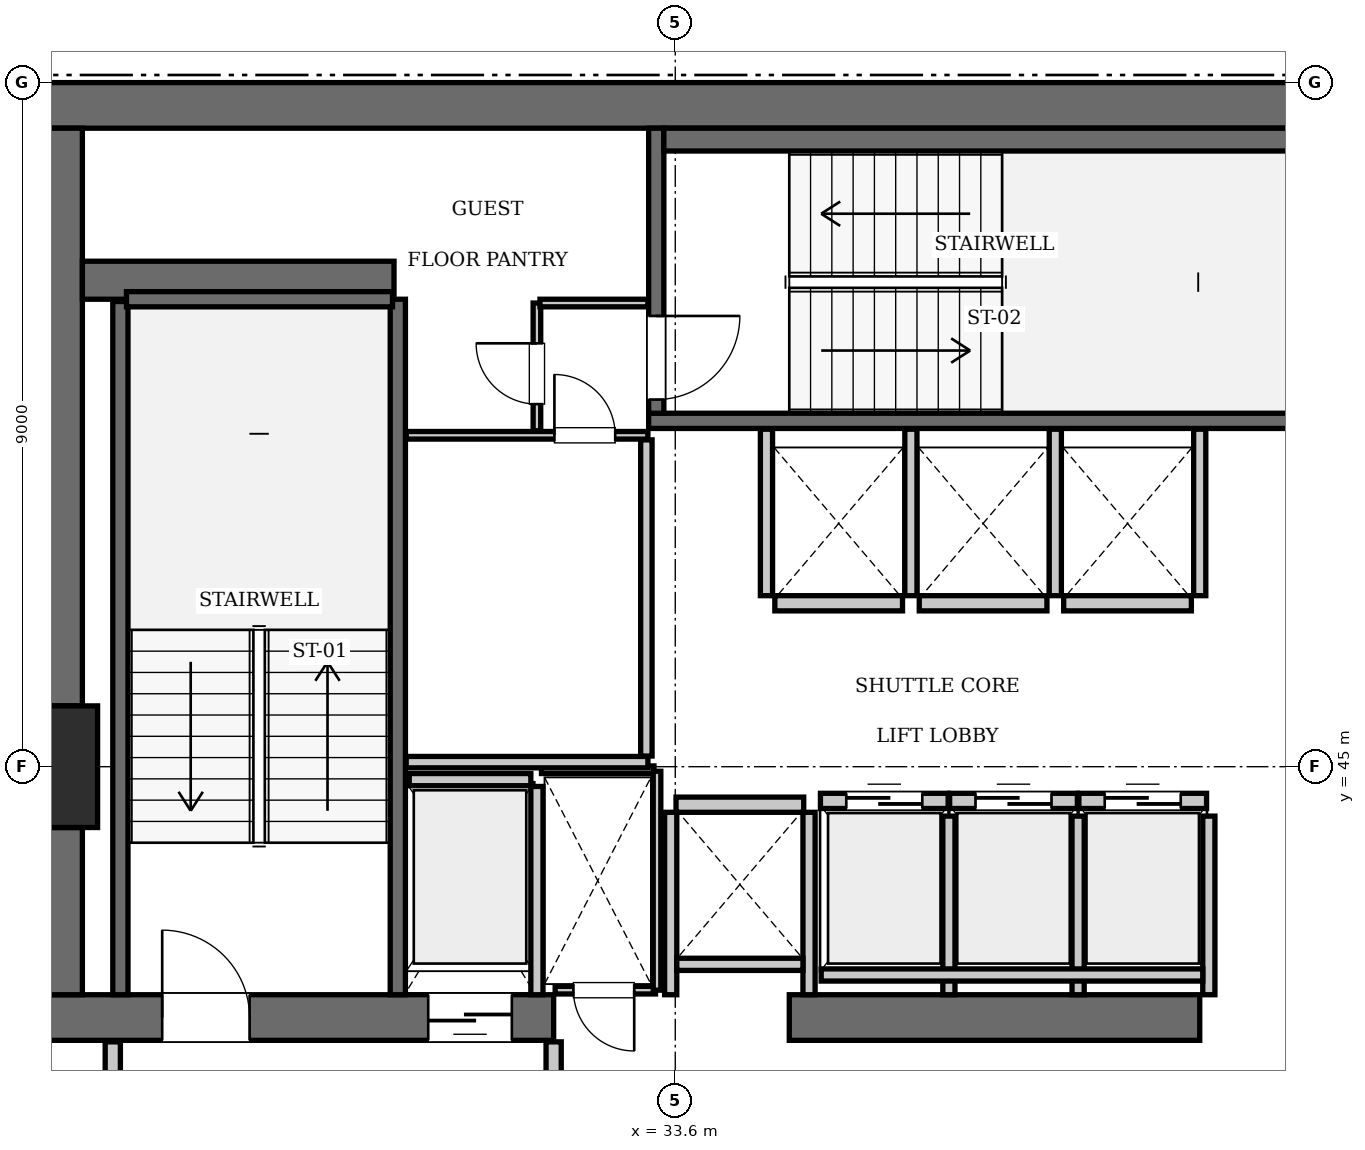
"""IFC4 building model, lengths in metres.
Left out: names, types, materials, properties, quantities, classifications, styles, units other than length and angle.
Written with IfcOpenShell. Run it as: python <this file> out.ifc"""

import sys

from ifc_helpers import new_model, si_unit, direction, frame, frame_2d, origin, origin_2d, place, context, subcontext, project, spatial, rectangle, extrude, element, fill, save


model = new_model("IFC4")
c1 = context("Model", 3, precision=1e-05, world=origin(), true_north=direction((0.0, 1.0)))
c2 = subcontext(c1, "Body", "Model", "MODEL_VIEW")
j1 = project(units=[si_unit("LENGTHUNIT", "METRE"), si_unit("PLANEANGLEUNIT", "RADIAN")], contexts=[c1])
p1 = place(None, origin())
s1 = spatial("IfcSite", under=j1, at=p1, CompositionType="ELEMENT")
p2 = place(p1, origin())
s2 = spatial("IfcBuilding", under=s1, at=p2, CompositionType="ELEMENT")
p3 = place(p2, frame((0.0, 0.0, 262.5)))
s3 = spatial("IfcBuildingStorey", under=s2, at=p3, CompositionType="ELEMENT", Elevation=262.5)
p4 = place(p3, frame((25.2, 45.0, 0.0), z_axis=(0.0, 0.0, 1.0), x_axis=(1.0, 0.0, 0.0)))
e1 = element("IfcColumn", 1, at=p4, inside=s3, PredefinedType="COLUMN", context=c2, shape_type="SweptSolid", body=[
    extrude(rectangle(XDim=1.6, YDim=1.6, at=origin_2d()), origin(), (0.0, 0.0, 1.0), 3.85),
])
p5 = place(p3, frame((25.2, 53.7, 0.0), z_axis=(0.0, 0.0, 1.0), x_axis=(1.0, 0.0, 0.0)))
e2 = element("IfcWall", 2, at=p5, inside=s3, PredefinedType="SHEAR", context=c2, shape_type="SweptSolid", body=[
    extrude(rectangle(XDim=25.2, YDim=0.6, at=frame_2d((12.6, 0.0))), origin(), (0.0, 0.0, 1.0), 3.85),
])
p6 = place(p3, frame((25.2, 41.7, 0.0), z_axis=(0.0, 0.0, 1.0), x_axis=(1.0, 0.0, 0.0)))
e3 = element("IfcWall", 3, at=p6, inside=s3, PredefinedType="SHEAR", context=c2, shape_type="SweptSolid", body=[
    extrude(rectangle(XDim=6.8, YDim=0.6, at=frame_2d((3.4, 0.0))), origin(), (0.0, 0.0, 1.0), 3.85),
])
p7 = place(p6, frame((1.65, 0.0, 0.0)))
e4 = element("IfcOpeningElement", 4, at=p7, cuts=e3, PredefinedType="OPENING", context=c2, shape_type="SweptSolid", body=[
    extrude(rectangle(XDim=1.15, YDim=2.15, at=frame_2d((0.575, 1.075))), frame((0.0, 0.31, 0.0), z_axis=(0.0, -1.0, 0.0), x_axis=(1.0, 0.0, 0.0)), (0.0, 0.0, 1.0), 0.62),
])
p8 = place(p6, frame((5.15, 0.0, 0.0)))
e5 = element("IfcOpeningElement", 5, at=p8, cuts=e3, PredefinedType="OPENING", context=c2, shape_type="SweptSolid", body=[
    extrude(rectangle(XDim=1.1, YDim=2.2, at=frame_2d((0.55, 1.1))), frame((0.0, 0.31, 0.0), z_axis=(0.0, -1.0, 0.0), x_axis=(1.0, 0.0, 0.0)), (0.0, 0.0, 1.0), 0.62),
])
p9 = place(p3, frame((35.1, 41.7, 0.0), z_axis=(0.0, 0.0, 1.0), x_axis=(1.0, 0.0, 0.0)))
e6 = element("IfcWall", 6, at=p9, inside=s3, PredefinedType="SHEAR", context=c2, shape_type="SweptSolid", body=[
    extrude(rectangle(XDim=5.4, YDim=0.6, at=frame_2d((2.7, 0.0))), origin(), (0.0, 0.0, 1.0), 3.85),
])
p10 = place(p3, frame((25.5, 42.0, 0.0), z_axis=(0.0, 0.0, 1.0), x_axis=(0.0, 1.0, 0.0)))
e7 = element("IfcWall", 7, at=p10, inside=s3, PredefinedType="SHEAR", context=c2, shape_type="SweptSolid", body=[
    extrude(rectangle(XDim=2.2, YDim=0.6, at=frame_2d((1.1, 0.0))), origin(), (0.0, 0.0, 1.0), 3.85),
])
p11 = place(p3, frame((25.5, 45.8, 0.0), z_axis=(0.0, 0.0, 1.0), x_axis=(0.0, 1.0, 0.0)))
e8 = element("IfcWall", 8, at=p11, inside=s3, PredefinedType="SHEAR", context=c2, shape_type="SweptSolid", body=[
    extrude(rectangle(XDim=7.6, YDim=0.6, at=frame_2d((3.8, 0.0))), origin(), (0.0, 0.0, 1.0), 3.85),
])
p12 = place(p3, frame((25.8, 51.4, 0.0), z_axis=(0.0, 0.0, 1.0), x_axis=(1.0, 0.0, 0.0)))
e9 = element("IfcWall", 9, at=p12, inside=s3, PredefinedType="SHEAR", context=c2, shape_type="SweptSolid", body=[
    extrude(rectangle(XDim=4.1, YDim=0.5, at=frame_2d((2.05, 0.0))), origin(), (0.0, 0.0, 1.0), 3.85),
])
p13 = place(p3, frame((29.95, 42.0, 0.0), z_axis=(0.0, 0.0, 1.0), x_axis=(0.0, 1.0, 0.0)))
e10 = element("IfcWall", 10, at=p13, inside=s3, PredefinedType="SOLIDWALL", context=c2, shape_type="SweptSolid", body=[
    extrude(rectangle(XDim=9.15, YDim=0.2, at=frame_2d((4.575, 0.0))), origin(), (0.0, 0.0, 1.0), 3.61),
])
p14 = place(p3, frame((26.3, 42.0, 0.0), z_axis=(0.0, 0.0, 1.0), x_axis=(0.0, 1.0, 0.0)))
e11 = element("IfcWall", 11, at=p14, inside=s3, PredefinedType="SOLIDWALL", context=c2, shape_type="SweptSolid", body=[
    extrude(rectangle(XDim=9.12, YDim=0.2, at=frame_2d((4.56, 0.0))), origin(), (0.0, 0.0, 1.0), 3.61),
])
p15 = place(p3, frame((26.38, 51.15, 0.0), z_axis=(0.0, 0.0, 1.0), x_axis=(1.0, 0.0, 0.0)))
e12 = element("IfcWall", 12, at=p15, inside=s3, PredefinedType="SOLIDWALL", context=c2, shape_type="SweptSolid", body=[
    extrude(rectangle(XDim=3.5, YDim=0.2, at=frame_2d((1.75, 0.0))), origin(), (0.0, 0.0, 1.0), 3.61),
])
p16 = place(p3, frame((33.25, 49.55, 0.0), z_axis=(0.0, 0.0, 1.0), x_axis=(1.0, 0.0, 0.0)))
e13 = element("IfcWall", 13, at=p16, inside=s3, PredefinedType="SOLIDWALL", context=c2, shape_type="SweptSolid", body=[
    extrude(rectangle(XDim=9.1, YDim=0.2, at=frame_2d((4.55, 0.0))), origin(), (0.0, 0.0, 1.0), 3.61),
])
p17 = place(p3, frame((33.35, 49.65, 0.0), z_axis=(0.0, 0.0, 1.0), x_axis=(0.0, 1.0, 0.0)))
e14 = element("IfcWall", 14, at=p17, inside=s3, PredefinedType="SOLIDWALL", context=c2, shape_type="SweptSolid", body=[
    extrude(rectangle(XDim=3.75, YDim=0.2, at=frame_2d((1.875, 0.0))), origin(), (0.0, 0.0, 1.0), 3.61),
])
p18 = place(p17, frame((0.18, 0.0, 0.0)))
e15 = element("IfcOpeningElement", 15, at=p18, cuts=e14, PredefinedType="OPENING", context=c2, shape_type="SweptSolid", body=[
    extrude(rectangle(XDim=1.1, YDim=2.15, at=frame_2d((0.55, 1.075))), frame((0.0, 0.11, 0.0), z_axis=(0.0, -1.0, 0.0), x_axis=(1.0, 0.0, 0.0)), (0.0, 0.0, 1.0), 0.22),
])
p19 = place(p3, frame((33.45, 53.25, 0.0), z_axis=(0.0, 0.0, 1.0), x_axis=(1.0, 0.0, 0.0)))
e16 = element("IfcWall", 16, at=p19, inside=s3, PredefinedType="SOLIDWALL", context=c2, shape_type="SweptSolid", body=[
    extrude(rectangle(XDim=8.7, YDim=0.3, at=frame_2d((4.35, 0.0))), origin(), (0.0, 0.0, 1.0), 3.61),
])
p20 = place(p3, frame((35.51, 44.55, 0.0), z_axis=(0.0, 0.0, 1.0), x_axis=(1.0, 0.0, 0.0)))
e17 = element("IfcWall", 17, at=p20, inside=s3, PredefinedType="SOLIDWALL", context=c2, shape_type="SweptSolid", body=[
    extrude(rectangle(XDim=1.68, YDim=0.2, at=frame_2d((0.84, 0.0))), origin(), (0.0, 0.0, 1.0), 3.61),
])
p21 = place(p20, frame((0.34, 0.0, 0.0)))
e18 = element("IfcOpeningElement", 18, at=p21, cuts=e17, PredefinedType="OPENING", context=c2, shape_type="SweptSolid", body=[
    extrude(rectangle(XDim=1.0, YDim=2.15, at=frame_2d((0.5, 1.075))), frame((0.0, 0.11, 0.0), z_axis=(0.0, -1.0, 0.0), x_axis=(1.0, 0.0, 0.0)), (0.0, 0.0, 1.0), 0.22),
])
p22 = place(p3, frame((37.21, 44.55, 0.0), z_axis=(0.0, 0.0, 1.0), x_axis=(1.0, 0.0, 0.0)))
e19 = element("IfcWall", 19, at=p22, inside=s3, PredefinedType="SOLIDWALL", context=c2, shape_type="SweptSolid", body=[
    extrude(rectangle(XDim=1.68, YDim=0.2, at=frame_2d((0.84, 0.0))), origin(), (0.0, 0.0, 1.0), 3.61),
])
p23 = place(p22, frame((0.34, 0.0, 0.0)))
e20 = element("IfcOpeningElement", 20, at=p23, cuts=e19, PredefinedType="OPENING", context=c2, shape_type="SweptSolid", body=[
    extrude(rectangle(XDim=1.0, YDim=2.15, at=frame_2d((0.5, 1.075))), frame((0.0, 0.11, 0.0), z_axis=(0.0, -1.0, 0.0), x_axis=(1.0, 0.0, 0.0)), (0.0, 0.0, 1.0), 0.22),
])
p24 = place(p3, frame((38.91, 44.55, 0.0), z_axis=(0.0, 0.0, 1.0), x_axis=(1.0, 0.0, 0.0)))
e21 = element("IfcWall", 21, at=p24, inside=s3, PredefinedType="SOLIDWALL", context=c2, shape_type="SweptSolid", body=[
    extrude(rectangle(XDim=1.68, YDim=0.2, at=frame_2d((0.84, 0.0))), origin(), (0.0, 0.0, 1.0), 3.61),
])
p25 = place(p24, frame((0.34, 0.0, 0.0)))
e22 = element("IfcOpeningElement", 22, at=p25, cuts=e21, PredefinedType="OPENING", context=c2, shape_type="SweptSolid", body=[
    extrude(rectangle(XDim=1.0, YDim=2.15, at=frame_2d((0.5, 1.075))), frame((0.0, 0.11, 0.0), z_axis=(0.0, -1.0, 0.0), x_axis=(1.0, 0.0, 0.0)), (0.0, 0.0, 1.0), 0.22),
])
p26 = place(p3, frame((34.91, 47.15, 0.0), z_axis=(0.0, 0.0, 1.0), x_axis=(1.0, 0.0, 0.0)))
e23 = element("IfcWall", 23, at=p26, inside=s3, PredefinedType="SOLIDWALL", context=c2, shape_type="SweptSolid", body=[
    extrude(rectangle(XDim=1.68, YDim=0.2, at=frame_2d((0.84, 0.0))), origin(), (0.0, 0.0, 1.0), 3.61),
])
for number, where, z_axis, x_axis in (
    (24, (36.81, 47.15, 0.0), (0.0, 0.0, 1.0), (1.0, 0.0, 0.0)),
    (25, (38.71, 47.15, 0.0), (0.0, 0.0, 1.0), (1.0, 0.0, 0.0)),
    (26, (33.61, 44.5, 0.0), (0.0, 0.0, 1.0), (1.0, 0.0, 0.0)),
):
    element("IfcWall", number, at=place(p3, frame(where, z_axis=z_axis, x_axis=x_axis)), inside=s3, PredefinedType="SOLIDWALL", context=c2, shape_type="SweptSolid", body=[
        extrude(rectangle(XDim=1.68, YDim=0.2, at=frame_2d((0.84, 0.0))), origin(), (0.0, 0.0, 1.0), 3.61),
    ])
p27 = place(p3, frame((30.1, 44.83, 0.0), z_axis=(0.0, 0.0, 1.0), x_axis=(1.0, 0.0, 0.0)))
e27 = element("IfcWall", 27, at=p27, inside=s3, PredefinedType="SOLIDWALL", context=c2, shape_type="SweptSolid", body=[
    extrude(rectangle(XDim=1.6, YDim=0.16, at=frame_2d((0.8, 0.0))), origin(), (0.0, 0.0, 1.0), 3.61),
])
p28 = place(p3, frame((31.78, 42.0, 0.0), z_axis=(0.0, 0.0, 1.0), x_axis=(0.0, 1.0, 0.0)))
e28 = element("IfcWall", 28, at=p28, inside=s3, PredefinedType="SOLIDWALL", context=c2, shape_type="SweptSolid", body=[
    extrude(rectangle(XDim=2.74, YDim=0.16, at=frame_2d((1.37, 0.0))), origin(), (0.0, 0.0, 1.0), 3.61),
])
for number, where, z_axis, x_axis in (
    (29, (37.2, 42.0, 0.0), (0.0, 0.0, 1.0), (0.0, 1.0, 0.0)),
    (30, (38.9, 42.0, 0.0), (0.0, 0.0, 1.0), (0.0, 1.0, 0.0)),
    (31, (40.62, 42.0, 0.0), (0.0, 0.0, 1.0), (0.0, 1.0, 0.0)),
):
    element("IfcWall", number, at=place(p3, frame(where, z_axis=z_axis, x_axis=x_axis)), inside=s3, PredefinedType="SOLIDWALL", context=c2, shape_type="SweptSolid", body=[
        extrude(rectangle(XDim=2.35, YDim=0.16, at=frame_2d((1.175, 0.0))), origin(), (0.0, 0.0, 1.0), 3.61),
    ])
p29 = place(p3, frame((35.52, 42.26, 0.0), z_axis=(0.0, 0.0, 1.0), x_axis=(1.0, 0.0, 0.0)))
e32 = element("IfcWall", 32, at=p29, inside=s3, PredefinedType="SOLIDWALL", context=c2, shape_type="SweptSolid", body=[
    extrude(rectangle(XDim=5.02, YDim=0.16, at=frame_2d((2.51, 0.0))), origin(), (0.0, 0.0, 1.0), 3.61),
])
for number, where, z_axis, x_axis in (
    (33, (34.8, 47.25, 0.0), (0.0, 0.0, 1.0), (0.0, 1.0, 0.0)),
    (34, (36.7, 47.25, 0.0), (0.0, 0.0, 1.0), (0.0, 1.0, 0.0)),
    (35, (38.6, 47.25, 0.0), (0.0, 0.0, 1.0), (0.0, 1.0, 0.0)),
    (36, (40.5, 47.25, 0.0), (0.0, 0.0, 1.0), (0.0, 1.0, 0.0)),
):
    element("IfcWall", number, at=place(p3, frame(where, z_axis=z_axis, x_axis=x_axis)), inside=s3, PredefinedType="SOLIDWALL", context=c2, shape_type="SweptSolid", body=[
        extrude(rectangle(XDim=2.19, YDim=0.16, at=frame_2d((1.095, 0.0))), origin(), (0.0, 0.0, 1.0), 3.61),
    ])
for number, where, z_axis, x_axis in (
    (37, (33.54, 42.0, 0.0), (0.0, 0.0, 1.0), (0.0, 1.0, 0.0)),
    (38, (35.36, 42.0, 0.0), (0.0, 0.0, 1.0), (0.0, 1.0, 0.0)),
):
    element("IfcWall", number, at=place(p3, frame(where, z_axis=z_axis, x_axis=x_axis)), inside=s3, PredefinedType="SOLIDWALL", context=c2, shape_type="SweptSolid", body=[
        extrude(rectangle(XDim=2.4, YDim=0.16, at=frame_2d((1.2, 0.0))), origin(), (0.0, 0.0, 1.0), 3.61),
    ])
p30 = place(p3, frame((33.62, 42.4, 0.0), z_axis=(0.0, 0.0, 1.0), x_axis=(1.0, 0.0, 0.0)))
e39 = element("IfcWall", 39, at=p30, inside=s3, PredefinedType="SOLIDWALL", context=c2, shape_type="SweptSolid", body=[
    extrude(rectangle(XDim=1.66, YDim=0.16, at=frame_2d((0.83, 0.0))), origin(), (0.0, 0.0, 1.0), 3.61),
])
for number, where, z_axis, x_axis in (
    (40, (26.2, 38.31, 0.0), (0.0, 0.0, 1.0), (0.0, 1.0, 0.0)),
    (41, (32.0, 38.31, 0.0), (0.0, 0.0, 1.0), (0.0, 1.0, 0.0)),
):
    element("IfcWall", number, at=place(p3, frame(where, z_axis=z_axis, x_axis=x_axis)), inside=s3, PredefinedType="PARTITIONING", context=c2, shape_type="SweptSolid", body=[
        extrude(rectangle(XDim=3.07, YDim=0.2, at=frame_2d((1.535, 0.0))), origin(), (0.0, 0.0, 1.0), 3.61),
    ])
p31 = place(p3, frame((32.02, 42.06, 0.0), z_axis=(0.0, 0.0, 1.0), x_axis=(1.0, 0.0, 0.0)))
e42 = element("IfcWall", 42, at=p31, inside=s3, PredefinedType="PARTITIONING", context=c2, shape_type="SweptSolid", body=[
    extrude(rectangle(XDim=1.32, YDim=0.1, at=frame_2d((0.66, 0.0))), origin(), (0.0, 0.0, 1.0), 3.61),
])
p32 = place(p31, frame((0.24, 0.0, 0.0)))
e43 = element("IfcOpeningElement", 43, at=p32, cuts=e42, PredefinedType="OPENING", context=c2, shape_type="SweptSolid", body=[
    extrude(rectangle(XDim=0.8, YDim=2.05, at=frame_2d((0.4, 1.025))), frame((0.0, 0.06, 0.0), z_axis=(0.0, -1.0, 0.0), x_axis=(1.0, 0.0, 0.0)), (0.0, 0.0, 1.0), 0.12),
])
p33 = place(p3, frame((31.84, 44.96, 0.0), z_axis=(0.0, 0.0, 1.0), x_axis=(1.0, 0.0, 0.0)))
e44 = element("IfcWall", 44, at=p33, inside=s3, PredefinedType="PARTITIONING", context=c2, shape_type="SweptSolid", body=[
    extrude(rectangle(XDim=1.48, YDim=0.1, at=frame_2d((0.74, 0.0))), origin(), (0.0, 0.0, 1.0), 3.61),
])
p34 = place(p3, frame((33.36, 42.06, 0.0), z_axis=(0.0, 0.0, 1.0), x_axis=(0.0, 1.0, 0.0)))
e45 = element("IfcWall", 45, at=p34, inside=s3, PredefinedType="PARTITIONING", context=c2, shape_type="SweptSolid", body=[
    extrude(rectangle(XDim=2.88, YDim=0.1, at=frame_2d((1.44, 0.0))), origin(), (0.0, 0.0, 1.0), 3.61),
])
p35 = place(p3, frame((30.06, 45.06, 0.0), z_axis=(0.0, 0.0, 1.0), x_axis=(1.0, 0.0, 0.0)))
e46 = element("IfcWall", 46, at=p35, inside=s3, PredefinedType="PARTITIONING", context=c2, shape_type="SweptSolid", body=[
    extrude(rectangle(XDim=3.18, YDim=0.15, at=frame_2d((1.59, 0.0))), origin(), (0.0, 0.0, 1.0), 3.61),
])
p36 = place(p3, frame((33.22, 45.14, 0.0), z_axis=(0.0, 0.0, 1.0), x_axis=(0.0, 1.0, 0.0)))
e47 = element("IfcWall", 47, at=p36, inside=s3, PredefinedType="PARTITIONING", context=c2, shape_type="SweptSolid", body=[
    extrude(rectangle(XDim=4.16, YDim=0.15, at=frame_2d((2.08, 0.0))), origin(), (0.0, 0.0, 1.0), 3.61),
])
p37 = place(p3, frame((30.06, 49.36, 0.0), z_axis=(0.0, 0.0, 1.0), x_axis=(1.0, 0.0, 0.0)))
e48 = element("IfcWall", 48, at=p37, inside=s3, PredefinedType="PARTITIONING", context=c2, shape_type="SweptSolid", body=[
    extrude(rectangle(XDim=3.18, YDim=0.1, at=frame_2d((1.59, 0.0))), origin(), (0.0, 0.0, 1.0), 3.61),
])
p38 = place(p37, frame((1.95, 0.0, 0.0)))
e49 = element("IfcOpeningElement", 49, at=p38, cuts=e48, PredefinedType="OPENING", context=c2, shape_type="SweptSolid", body=[
    extrude(rectangle(XDim=0.8, YDim=2.05, at=frame_2d((0.4, 1.025))), frame((0.0, 0.06, 0.0), z_axis=(0.0, -1.0, 0.0), x_axis=(1.0, 0.0, 0.0)), (0.0, 0.0, 1.0), 0.12),
])
p39 = place(p3, frame((31.78, 49.42, 0.0), z_axis=(0.0, 0.0, 1.0), x_axis=(0.0, 1.0, 0.0)))
e50 = element("IfcWall", 50, at=p39, inside=s3, PredefinedType="PARTITIONING", context=c2, shape_type="SweptSolid", body=[
    extrude(rectangle(XDim=1.68, YDim=0.1, at=frame_2d((0.84, 0.0))), origin(), (0.0, 0.0, 1.0), 3.61),
])
p40 = place(p39, frame((0.35, 0.0, 0.0)))
e51 = element("IfcOpeningElement", 51, at=p40, cuts=e50, PredefinedType="OPENING", context=c2, shape_type="SweptSolid", body=[
    extrude(rectangle(XDim=0.8, YDim=2.05, at=frame_2d((0.4, 1.025))), frame((0.0, 0.06, 0.0), z_axis=(0.0, -1.0, 0.0), x_axis=(1.0, 0.0, 0.0)), (0.0, 0.0, 1.0), 0.12),
])
p41 = place(p3, frame((31.82, 51.1, 0.0), z_axis=(0.0, 0.0, 1.0), x_axis=(1.0, 0.0, 0.0)))
e52 = element("IfcWall", 52, at=p41, inside=s3, PredefinedType="PARTITIONING", context=c2, shape_type="SweptSolid", body=[
    extrude(rectangle(XDim=1.42, YDim=0.1, at=frame_2d((0.71, 0.0))), origin(), (0.0, 0.0, 1.0), 3.61),
])
p42 = place(p7, origin())
e53 = element("IfcDoor", 53, at=p42, inside=s3, OperationType="SINGLE_SWING_LEFT", PredefinedType="DOOR", context=c2, shape_type="SweptSolid", body=[
    extrude(rectangle(XDim=1.15, YDim=2.15, at=frame_2d((0.575, 1.075))), frame((0.0, 0.025, 0.0), z_axis=(0.0, -1.0, 0.0), x_axis=(1.0, 0.0, 0.0)), (0.0, 0.0, 1.0), 0.05),
])
fill(e4, e53)
p43 = place(p18, frame((1.1, 0.0, 0.0), z_axis=(0.0, 0.0, 1.0), x_axis=(-1.0, 0.0, 0.0)))
e54 = element("IfcDoor", 54, at=p43, inside=s3, OperationType="SINGLE_SWING_LEFT", PredefinedType="DOOR", context=c2, shape_type="SweptSolid", body=[
    extrude(rectangle(XDim=1.1, YDim=2.15, at=frame_2d((0.55, 1.075))), frame((0.0, 0.025, 0.0), z_axis=(0.0, -1.0, 0.0), x_axis=(1.0, 0.0, 0.0)), (0.0, 0.0, 1.0), 0.05),
])
fill(e15, e54)
p44 = place(p21, origin())
e55 = element("IfcDoor", 55, at=p44, inside=s3, OperationType="SLIDING_TO_LEFT", PredefinedType="DOOR", context=c2, shape_type="SweptSolid", body=[
    extrude(rectangle(XDim=1.0, YDim=2.15, at=frame_2d((0.5, 1.075))), frame((0.0, 0.025, 0.0), z_axis=(0.0, -1.0, 0.0), x_axis=(1.0, 0.0, 0.0)), (0.0, 0.0, 1.0), 0.05),
])
fill(e18, e55)
p45 = place(p23, origin())
e56 = element("IfcDoor", 56, at=p45, inside=s3, OperationType="SLIDING_TO_LEFT", PredefinedType="DOOR", context=c2, shape_type="SweptSolid", body=[
    extrude(rectangle(XDim=1.0, YDim=2.15, at=frame_2d((0.5, 1.075))), frame((0.0, 0.025, 0.0), z_axis=(0.0, -1.0, 0.0), x_axis=(1.0, 0.0, 0.0)), (0.0, 0.0, 1.0), 0.05),
])
fill(e20, e56)
p46 = place(p25, origin())
e57 = element("IfcDoor", 57, at=p46, inside=s3, OperationType="SLIDING_TO_LEFT", PredefinedType="DOOR", context=c2, shape_type="SweptSolid", body=[
    extrude(rectangle(XDim=1.0, YDim=2.15, at=frame_2d((0.5, 1.075))), frame((0.0, 0.025, 0.0), z_axis=(0.0, -1.0, 0.0), x_axis=(1.0, 0.0, 0.0)), (0.0, 0.0, 1.0), 0.05),
])
fill(e22, e57)
p47 = place(p8, frame((1.1, 0.0, 0.0), z_axis=(0.0, 0.0, 1.0), x_axis=(-1.0, 0.0, 0.0)))
e58 = element("IfcDoor", 58, at=p47, inside=s3, OperationType="SLIDING_TO_LEFT", PredefinedType="DOOR", context=c2, shape_type="SweptSolid", body=[
    extrude(rectangle(XDim=1.1, YDim=2.2, at=frame_2d((0.55, 1.1))), frame((0.0, 0.025, 0.0), z_axis=(0.0, -1.0, 0.0), x_axis=(1.0, 0.0, 0.0)), (0.0, 0.0, 1.0), 0.05),
])
fill(e5, e58)
p48 = place(p32, frame((0.8, 0.0, 0.0), z_axis=(0.0, 0.0, 1.0), x_axis=(-1.0, 0.0, 0.0)))
e59 = element("IfcDoor", 59, at=p48, inside=s3, OperationType="SINGLE_SWING_LEFT", PredefinedType="DOOR", context=c2, shape_type="SweptSolid", body=[
    extrude(rectangle(XDim=0.8, YDim=2.05, at=frame_2d((0.4, 1.025))), frame((0.0, 0.025, 0.0), z_axis=(0.0, -1.0, 0.0), x_axis=(1.0, 0.0, 0.0)), (0.0, 0.0, 1.0), 0.05),
])
fill(e43, e59)
p49 = place(p38, origin())
e60 = element("IfcDoor", 60, at=p49, inside=s3, OperationType="SINGLE_SWING_LEFT", PredefinedType="DOOR", context=c2, shape_type="SweptSolid", body=[
    extrude(rectangle(XDim=0.8, YDim=2.05, at=frame_2d((0.4, 1.025))), frame((0.0, 0.025, 0.0), z_axis=(0.0, -1.0, 0.0), x_axis=(1.0, 0.0, 0.0)), (0.0, 0.0, 1.0), 0.05),
])
fill(e49, e60)
p50 = place(p40, origin())
e61 = element("IfcDoor", 61, at=p50, inside=s3, OperationType="SINGLE_SWING_RIGHT", PredefinedType="DOOR", context=c2, shape_type="SweptSolid", body=[
    extrude(rectangle(XDim=0.8, YDim=2.05, at=frame_2d((0.4, 1.025))), frame((0.0, 0.025, 0.0), z_axis=(0.0, -1.0, 0.0), x_axis=(1.0, 0.0, 0.0)), (0.0, 0.0, 1.0), 0.05),
])
fill(e51, e61)
save(model, sys.argv[1])
